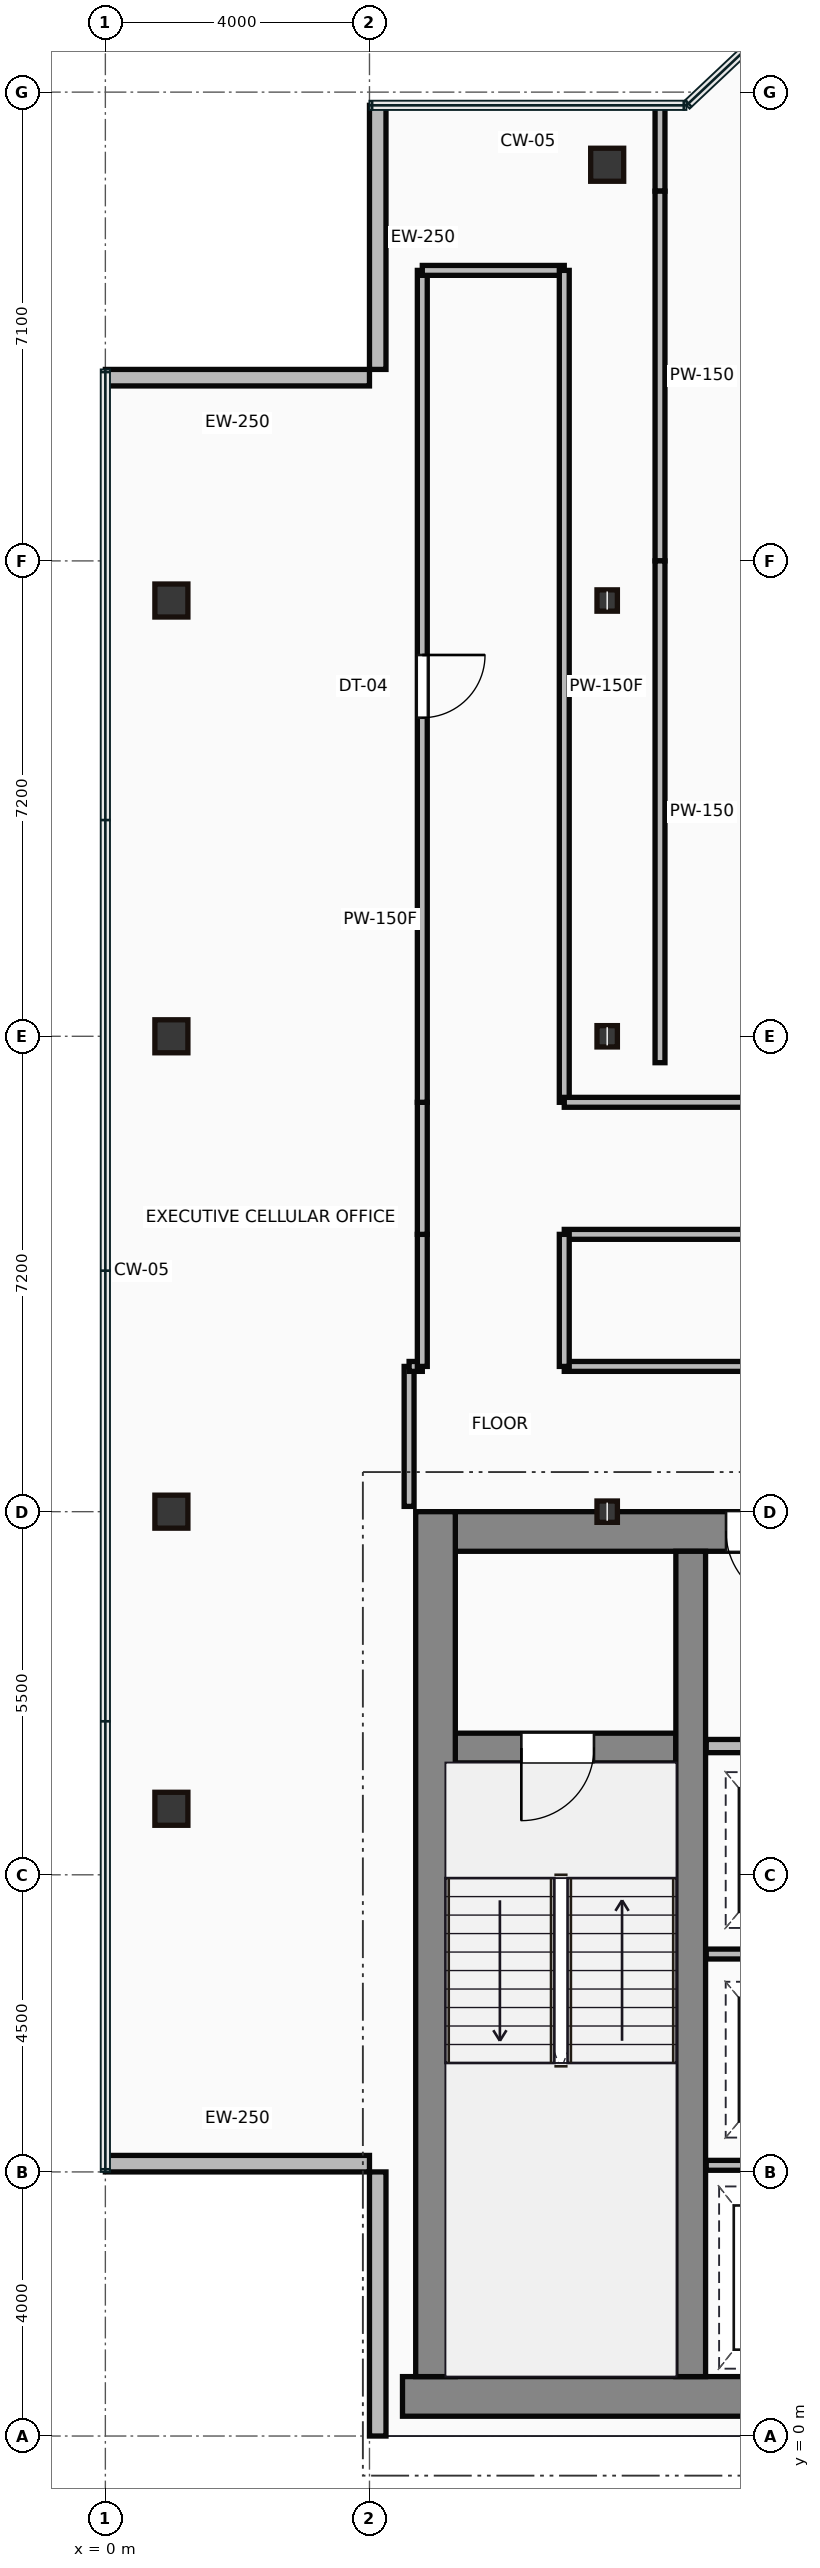
"""IFC4 building model, lengths in metres.
Left out: names, types, materials, properties, quantities, classifications, styles, units other than length and angle.
Written with IfcOpenShell. Run it as: python <this file> out.ifc"""

import sys

from ifc_helpers import new_model, si_unit, direction, frame, frame_2d, origin, origin_2d, place, context, subcontext, project, spatial, rectangle, hollow_rectangle, i_section, extrude, source, transform, mapped, element, fill, save


model = new_model("IFC4")
c1 = context("Model", 3, precision=1e-05, world=origin(), true_north=direction((0.0, 1.0)))
c2 = subcontext(c1, "Body", "Model", "MODEL_VIEW")
j1 = project(units=[si_unit("LENGTHUNIT", "METRE"), si_unit("PLANEANGLEUNIT", "RADIAN")], contexts=[c1])
p1 = place(None, origin())
s1 = spatial("IfcSite", under=j1, at=p1, CompositionType="ELEMENT")
p2 = place(p1, origin())
s2 = spatial("IfcBuilding", under=s1, at=p2, CompositionType="ELEMENT")
p3 = place(p2, frame((0.0, 0.0, 240.55)))
s3 = spatial("IfcBuildingStorey", under=s2, at=p3, CompositionType="ELEMENT", Elevation=240.55)
m1 = source(origin(), c2, "Body", "SweptSolid", [
    extrude(rectangle(XDim=29.5, YDim=0.6, at=frame_2d((14.75, 0.0))), origin(), (0.0, 0.0, 1.0), 3.65),
])
p4 = place(p3, frame((4.5, 0.6, 0.0), z_axis=(0.0, 0.0, 1.0), x_axis=(1.0, 0.0, 0.0)))
e1 = element("IfcWall", 1, at=p4, inside=s3, PredefinedType="SHEAR", context=c2, shape_type="MappedRepresentation", body=[
    mapped(m1, transform((0.0, 0.0, 0.0))),
])
m2 = source(origin(), c2, "Body", "SweptSolid", [
    extrude(rectangle(XDim=13.1, YDim=0.6, at=frame_2d((6.55, 0.0))), origin(), (0.0, 0.0, 1.0), 3.65),
])
p5 = place(p3, frame((5.0, 0.9, 0.0), z_axis=(0.0, 0.0, 1.0), x_axis=(0.0, 1.0, 0.0)))
e2 = element("IfcWall", 2, at=p5, inside=s3, PredefinedType="SHEAR", context=c2, shape_type="MappedRepresentation", body=[
    mapped(m2, transform((0.0, 0.0, 0.0))),
])
m3 = source(origin(), c2, "Body", "SweptSolid", [
    extrude(rectangle(XDim=9.1, YDim=0.6, at=frame_2d((4.55, 0.0))), origin(), (0.0, 0.0, 1.0), 3.65),
])
p6 = place(p3, frame((5.3, 13.7, 0.0), z_axis=(0.0, 0.0, 1.0), x_axis=(1.0, 0.0, 0.0)))
e3 = element("IfcWall", 3, at=p6, inside=s3, PredefinedType="SHEAR", context=c2, shape_type="MappedRepresentation", body=[
    mapped(m3, transform((0.0, 0.0, 0.0))),
])
p7 = place(p6, frame((4.1, 0.0, 0.0)))
e4 = element("IfcOpeningElement", 4, at=p7, cuts=e3, PredefinedType="OPENING", context=c2, shape_type="SweptSolid", body=[
    extrude(rectangle(XDim=1.1, YDim=2.15, at=frame_2d((0.55, 1.075))), frame((0.0, 0.31, 0.0), z_axis=(0.0, -1.0, 0.0), x_axis=(1.0, 0.0, 0.0)), (0.0, 0.0, 1.0), 0.62),
])
m4 = source(origin(), c2, "Body", "SweptSolid", [
    extrude(rectangle(XDim=12.5, YDim=0.45, at=frame_2d((6.25, 0.0))), origin(), (0.0, 0.0, 1.0), 3.65),
])
p8 = place(p3, frame((8.865, 0.9, 0.0), z_axis=(0.0, 0.0, 1.0), x_axis=(0.0, 1.0, 0.0)))
e5 = element("IfcWall", 5, at=p8, inside=s3, PredefinedType="SHEAR", context=c2, shape_type="MappedRepresentation", body=[
    mapped(m4, transform((0.0, 0.0, 0.0))),
])
m5 = source(origin(), c2, "Body", "SweptSolid", [
    extrude(rectangle(XDim=3.39, YDim=0.45, at=frame_2d((1.695, 0.0))), origin(), (0.0, 0.0, 1.0), 3.65),
])
p9 = place(p3, frame((5.25, 10.42, 0.0), z_axis=(0.0, 0.0, 1.0), x_axis=(1.0, 0.0, 0.0)))
e6 = element("IfcWall", 6, at=p9, inside=s3, PredefinedType="SHEAR", context=c2, shape_type="MappedRepresentation", body=[
    mapped(m5, transform((0.0, 0.0, 0.0))),
])
p10 = place(p9, frame((1.05, 0.0, 0.0)))
e7 = element("IfcOpeningElement", 7, at=p10, cuts=e6, PredefinedType="OPENING", context=c2, shape_type="SweptSolid", body=[
    extrude(rectangle(XDim=1.1, YDim=2.15, at=frame_2d((0.55, 1.075))), frame((0.0, 0.235, 0.0), z_axis=(0.0, -1.0, 0.0), x_axis=(1.0, 0.0, 0.0)), (0.0, 0.0, 1.0), 0.47),
])
m6 = source(origin(), c2, "Body", "SweptSolid", [
    extrude(hollow_rectangle(XDim=0.5, YDim=0.5, WallThickness=0.022, at=origin_2d()), origin(), (0.0, 0.0, 1.0), 3.65),
])
for number, where, z_axis, x_axis in (
    (8, (1.0, 9.5, 0.0), (0.0, 0.0, 1.0), (1.0, 0.0, 0.0)),
    (9, (1.0, 14.0, 0.0), (0.0, 0.0, 1.0), (1.0, 0.0, 0.0)),
    (10, (1.0, 21.2, 0.0), (0.0, 0.0, 1.0), (1.0, 0.0, 0.0)),
    (11, (1.0, 27.8, 0.0), (0.0, 0.0, 1.0), (1.0, 0.0, 0.0)),
):
    element("IfcColumn", number, at=place(p3, frame(where, z_axis=z_axis, x_axis=x_axis)), inside=s3, PredefinedType="COLUMN", context=c2, shape_type="MappedRepresentation", body=[
        mapped(m6, transform((0.0, 0.0, 0.0))),
    ])
m7 = source(origin(), c2, "Body", "SweptSolid", [
    extrude(i_section(OverallWidth=0.309, OverallDepth=0.323, WebThickness=0.014, FlangeThickness=0.023, at=origin_2d()), origin(), (0.0, 0.0, 1.0), 3.65),
])
for number, where, z_axis, x_axis in (
    (12, (7.6, 14.0, 0.0), (0.0, 0.0, 1.0), (1.0, 0.0, 0.0)),
    (13, (7.6, 21.2, 0.0), (0.0, 0.0, 1.0), (1.0, 0.0, 0.0)),
    (14, (7.6, 27.8, 0.0), (0.0, 0.0, 1.0), (1.0, 0.0, 0.0)),
):
    element("IfcColumn", number, at=place(p3, frame(where, z_axis=z_axis, x_axis=x_axis)), inside=s3, PredefinedType="COLUMN", context=c2, shape_type="MappedRepresentation", body=[
        mapped(m7, transform((0.0, 0.0, 0.0))),
    ])
p11 = place(p3, frame((7.6, 34.4, 0.0), z_axis=(0.0, 0.0, 1.0), x_axis=(1.0, 0.0, 0.0)))
e15 = element("IfcColumn", 15, at=p11, inside=s3, PredefinedType="COLUMN", context=c2, shape_type="MappedRepresentation", body=[
    mapped(m6, transform((0.0, 0.0, 0.0))),
])
m8 = source(origin(), c2, "Body", "SweptSolid", [
    extrude(rectangle(XDim=4.0, YDim=0.25, at=frame_2d((2.0, 0.0))), origin(), (0.0, 0.0, 1.0), 3.4),
])
for number, where, z_axis, x_axis in (
    (16, (4.125, 35.3, 0.0), (0.0, 0.0, 1.0), (0.0, -1.0, 0.0)),
    (17, (4.0, 31.175, 0.0), (0.0, 0.0, 1.0), (-1.0, 0.0, 0.0)),
    (18, (0.0, 4.125, 0.0), (0.0, 0.0, 1.0), (1.0, 0.0, 0.0)),
    (19, (4.125, 4.0, 0.0), (0.0, 0.0, 1.0), (0.0, -1.0, 0.0)),
):
    element("IfcWall", number, at=place(p3, frame(where, z_axis=z_axis, x_axis=x_axis)), inside=s3, PredefinedType="STANDARD", context=c2, shape_type="MappedRepresentation", body=[
        mapped(m8, transform((0.0, 0.0, 0.0))),
    ])
m9 = source(origin(), c2, "Body", "SweptSolid", [
    extrude(rectangle(XDim=2.35, YDim=0.2, at=frame_2d((1.175, 0.0))), origin(), (0.0, 0.0, 1.0), 3.4),
])
p12 = place(p3, frame((9.1, 10.45, 0.0), z_axis=(0.0, 0.0, 1.0), x_axis=(1.0, 0.0, 0.0)))
e20 = element("IfcWall", 20, at=p12, inside=s3, PredefinedType="PARTITIONING", context=c2, shape_type="MappedRepresentation", body=[
    mapped(m9, transform((0.0, 0.0, 0.0))),
])
p13 = place(p12, frame((0.55, 0.0, 0.0)))
e21 = element("IfcOpeningElement", 21, at=p13, cuts=e20, PredefinedType="OPENING", context=c2, shape_type="SweptSolid", body=[
    extrude(rectangle(XDim=1.1, YDim=2.15, at=frame_2d((0.55, 1.075))), frame((0.0, 0.11, 0.0), z_axis=(0.0, -1.0, 0.0), x_axis=(1.0, 0.0, 0.0)), (0.0, 0.0, 1.0), 0.22),
])
m10 = source(origin(), c2, "Body", "SweptSolid", [
    extrude(rectangle(XDim=2.4, YDim=0.15, at=frame_2d((1.2, 0.0))), origin(), (0.0, 0.0, 1.0), 3.4),
])
for number, where, z_axis, x_axis in (
    (22, (9.1, 4.1, 0.0), (0.0, 0.0, 1.0), (1.0, 0.0, 0.0)),
    (23, (9.1, 7.3, 0.0), (0.0, 0.0, 1.0), (1.0, 0.0, 0.0)),
):
    element("IfcWall", number, at=place(p3, frame(where, z_axis=z_axis, x_axis=x_axis)), inside=s3, PredefinedType="PARTITIONING", context=c2, shape_type="MappedRepresentation", body=[
        mapped(m10, transform((0.0, 0.0, 0.0))),
    ])
m11 = source(origin(), c2, "Body", "SweptSolid", [
    extrude(rectangle(XDim=2.12, YDim=0.15, at=frame_2d((1.06, 0.0))), origin(), (0.0, 0.0, 1.0), 3.4),
])
p14 = place(p3, frame((4.6, 14.08, 0.0), z_axis=(0.0, 0.0, 1.0), x_axis=(0.0, 1.0, 0.0)))
e24 = element("IfcWall", 24, at=p14, inside=s3, PredefinedType="PARTITIONING", context=c2, shape_type="MappedRepresentation", body=[
    mapped(m11, transform((0.0, 0.0, 0.0))),
])
m12 = source(origin(), c2, "Body", "SweptSolid", [
    extrude(rectangle(XDim=0.2, YDim=0.15, at=frame_2d((0.1, 0.0))), origin(), (0.0, 0.0, 1.0), 3.4),
])
p15 = place(p3, frame((4.6, 16.2, 0.0), z_axis=(0.0, 0.0, 1.0), x_axis=(1.0, 0.0, 0.0)))
e25 = element("IfcWall", 25, at=p15, inside=s3, PredefinedType="PARTITIONING", context=c2, shape_type="MappedRepresentation", body=[
    mapped(m12, transform((0.0, 0.0, 0.0))),
])
m13 = source(origin(), c2, "Body", "SweptSolid", [
    extrude(rectangle(XDim=2.0, YDim=0.15, at=frame_2d((1.0, 0.0))), origin(), (0.0, 0.0, 1.0), 3.4),
])
for number, where, z_axis, x_axis in (
    (26, (4.8, 16.2, 0.0), (0.0, 0.0, 1.0), (0.0, 1.0, 0.0)),
    (27, (4.8, 18.2, 0.0), (0.0, 0.0, 1.0), (0.0, 1.0, 0.0)),
):
    element("IfcWall", number, at=place(p3, frame(where, z_axis=z_axis, x_axis=x_axis)), inside=s3, PredefinedType="PARTITIONING", context=c2, shape_type="MappedRepresentation", body=[
        mapped(m13, transform((0.0, 0.0, 0.0))),
    ])
m14 = source(origin(), c2, "Body", "SweptSolid", [
    extrude(rectangle(XDim=12.6, YDim=0.15, at=frame_2d((6.3, 0.0))), origin(), (0.0, 0.0, 1.0), 3.4),
])
p16 = place(p3, frame((4.8, 20.2, 0.0), z_axis=(0.0, 0.0, 1.0), x_axis=(0.0, 1.0, 0.0)))
e28 = element("IfcWall", 28, at=p16, inside=s3, PredefinedType="PARTITIONING", context=c2, shape_type="MappedRepresentation", body=[
    mapped(m14, transform((0.0, 0.0, 0.0))),
])
p17 = place(p16, frame((5.825, 0.0, 0.0)))
e29 = element("IfcOpeningElement", 29, at=p17, cuts=e28, PredefinedType="OPENING", context=c2, shape_type="SweptSolid", body=[
    extrude(rectangle(XDim=0.95, YDim=2.15, at=frame_2d((0.475, 1.075))), frame((0.0, 0.085, 0.0), z_axis=(0.0, -1.0, 0.0), x_axis=(1.0, 0.0, 0.0)), (0.0, 0.0, 1.0), 0.17),
])
m15 = source(origin(), c2, "Body", "SweptSolid", [
    extrude(rectangle(XDim=2.15, YDim=0.15, at=frame_2d((1.075, 0.0))), origin(), (0.0, 0.0, 1.0), 3.4),
])
p18 = place(p3, frame((4.8, 32.8, 0.0), z_axis=(0.0, 0.0, 1.0), x_axis=(1.0, 0.0, 0.0)))
e30 = element("IfcWall", 30, at=p18, inside=s3, PredefinedType="PARTITIONING", context=c2, shape_type="MappedRepresentation", body=[
    mapped(m15, transform((0.0, 0.0, 0.0))),
])
p19 = place(p3, frame((6.95, 32.8, 0.0), z_axis=(0.0, 0.0, 1.0), x_axis=(0.0, -1.0, 0.0)))
e31 = element("IfcWall", 31, at=p19, inside=s3, PredefinedType="PARTITIONING", context=c2, shape_type="MappedRepresentation", body=[
    mapped(m14, transform((0.0, 0.0, 0.0))),
])
m16 = source(origin(), c2, "Body", "SweptSolid", [
    extrude(rectangle(XDim=23.25, YDim=0.15, at=frame_2d((11.625, 0.0))), origin(), (0.0, 0.0, 1.0), 3.4),
])
p20 = place(p3, frame((6.95, 20.2, 0.0), z_axis=(0.0, 0.0, 1.0), x_axis=(1.0, 0.0, 0.0)))
e32 = element("IfcWall", 32, at=p20, inside=s3, PredefinedType="PARTITIONING", context=c2, shape_type="MappedRepresentation", body=[
    mapped(m16, transform((0.0, 0.0, 0.0))),
])
p21 = place(p20, frame((9.175, 0.0, 0.0)))
e33 = element("IfcOpeningElement", 33, at=p21, cuts=e32, PredefinedType="OPENING", context=c2, shape_type="SweptSolid", body=[
    extrude(rectangle(XDim=0.95, YDim=2.15, at=frame_2d((0.475, 1.075))), frame((0.0, 0.085, 0.0), z_axis=(0.0, -1.0, 0.0), x_axis=(1.0, 0.0, 0.0)), (0.0, 0.0, 1.0), 0.17),
])
p22 = place(p3, frame((6.95, 16.2, 0.0), z_axis=(0.0, 0.0, 1.0), x_axis=(1.0, 0.0, 0.0)))
e34 = element("IfcWall", 34, at=p22, inside=s3, PredefinedType="PARTITIONING", context=c2, shape_type="MappedRepresentation", body=[
    mapped(m16, transform((0.0, 0.0, 0.0))),
])
p23 = place(p22, frame((4.38, 0.0, 0.0)))
e35 = element("IfcOpeningElement", 35, at=p23, cuts=e34, PredefinedType="OPENING", context=c2, shape_type="SweptSolid", body=[
    extrude(rectangle(XDim=0.95, YDim=2.15, at=frame_2d((0.475, 1.075))), frame((0.0, 0.085, 0.0), z_axis=(0.0, -1.0, 0.0), x_axis=(1.0, 0.0, 0.0)), (0.0, 0.0, 1.0), 0.17),
])
p24 = place(p22, frame((15.745, 0.0, 0.0)))
e36 = element("IfcOpeningElement", 36, at=p24, cuts=e34, PredefinedType="OPENING", context=c2, shape_type="SweptSolid", body=[
    extrude(rectangle(XDim=0.95, YDim=2.15, at=frame_2d((0.475, 1.075))), frame((0.0, 0.085, 0.0), z_axis=(0.0, -1.0, 0.0), x_axis=(1.0, 0.0, 0.0)), (0.0, 0.0, 1.0), 0.17),
])
p25 = place(p3, frame((30.2, 18.2, 0.0), z_axis=(0.0, 0.0, 1.0), x_axis=(-1.0, 0.0, 0.0)))
e37 = element("IfcWall", 37, at=p25, inside=s3, PredefinedType="PARTITIONING", context=c2, shape_type="MappedRepresentation", body=[
    mapped(m16, transform((0.0, 0.0, 0.0))),
])
p26 = place(p3, frame((6.95, 18.2, 0.0), z_axis=(0.0, 0.0, 1.0), x_axis=(0.0, -1.0, 0.0)))
e38 = element("IfcWall", 38, at=p26, inside=s3, PredefinedType="PARTITIONING", context=c2, shape_type="MappedRepresentation", body=[
    mapped(m13, transform((0.0, 0.0, 0.0))),
])
m17 = source(origin(), c2, "Body", "SweptSolid", [
    extrude(rectangle(XDim=1.28, YDim=0.15, at=frame_2d((0.64, 0.0))), origin(), (0.0, 0.0, 1.0), 3.4),
])
p27 = place(p3, frame((8.4, 35.28, 0.0), z_axis=(0.0, 0.0, 1.0), x_axis=(0.0, -1.0, 0.0)))
e39 = element("IfcWall", 39, at=p27, inside=s3, PredefinedType="PARTITIONING", context=c2, shape_type="MappedRepresentation", body=[
    mapped(m17, transform((0.0, 0.0, 0.0))),
])
m18 = source(origin(), c2, "Body", "SweptSolid", [
    extrude(rectangle(XDim=5.6, YDim=0.15, at=frame_2d((2.8, 0.0))), origin(), (0.0, 0.0, 1.0), 3.4),
])
p28 = place(p3, frame((8.4, 34.0, 0.0), z_axis=(0.0, 0.0, 1.0), x_axis=(0.0, -1.0, 0.0)))
e40 = element("IfcWall", 40, at=p28, inside=s3, PredefinedType="PARTITIONING", context=c2, shape_type="MappedRepresentation", body=[
    mapped(m18, transform((0.0, 0.0, 0.0))),
])
m19 = source(origin(), c2, "Body", "SweptSolid", [
    extrude(rectangle(XDim=7.6, YDim=0.15, at=frame_2d((3.8, 0.0))), origin(), (0.0, 0.0, 1.0), 3.4),
])
p29 = place(p3, frame((8.4, 28.4, 0.0), z_axis=(0.0, 0.0, 1.0), x_axis=(0.0, -1.0, 0.0)))
e41 = element("IfcWall", 41, at=p29, inside=s3, PredefinedType="PARTITIONING", context=c2, shape_type="MappedRepresentation", body=[
    mapped(m19, transform((0.0, 0.0, 0.0))),
])
m20 = source(origin(), c2, "Body", "SweptSolid", [
    extrude(rectangle(XDim=1.1, YDim=2.15, at=frame_2d((0.55, 1.075))), frame((0.0, 0.025, 0.0), z_axis=(0.0, -1.0, 0.0), x_axis=(1.0, 0.0, 0.0)), (0.0, 0.0, 1.0), 0.05),
])
p30 = place(p10, frame((1.1, 0.0, 0.0), z_axis=(0.0, 0.0, 1.0), x_axis=(-1.0, 0.0, 0.0)))
e42 = element("IfcDoor", 42, at=p30, inside=s3, OperationType="SINGLE_SWING_LEFT", PredefinedType="DOOR", context=c2, shape_type="MappedRepresentation", body=[
    mapped(m20, transform((0.0, 0.0, 0.0))),
])
fill(e7, e42)
p31 = place(p7, origin())
e43 = element("IfcDoor", 43, at=p31, inside=s3, OperationType="SINGLE_SWING_RIGHT", PredefinedType="DOOR", context=c2, shape_type="MappedRepresentation", body=[
    mapped(m20, transform((0.0, 0.0, 0.0))),
])
fill(e4, e43)
m21 = source(origin(), c2, "Body", "SweptSolid", [
    extrude(rectangle(XDim=0.95, YDim=2.15, at=frame_2d((0.475, 1.075))), frame((0.0, 0.025, 0.0), z_axis=(0.0, -1.0, 0.0), x_axis=(1.0, 0.0, 0.0)), (0.0, 0.0, 1.0), 0.05),
])
p32 = place(p17, origin())
e44 = element("IfcDoor", 44, at=p32, inside=s3, OperationType="SINGLE_SWING_RIGHT", PredefinedType="DOOR", context=c2, shape_type="MappedRepresentation", body=[
    mapped(m21, transform((0.0, 0.0, 0.0))),
])
fill(e29, e44)
save(model, sys.argv[1])
